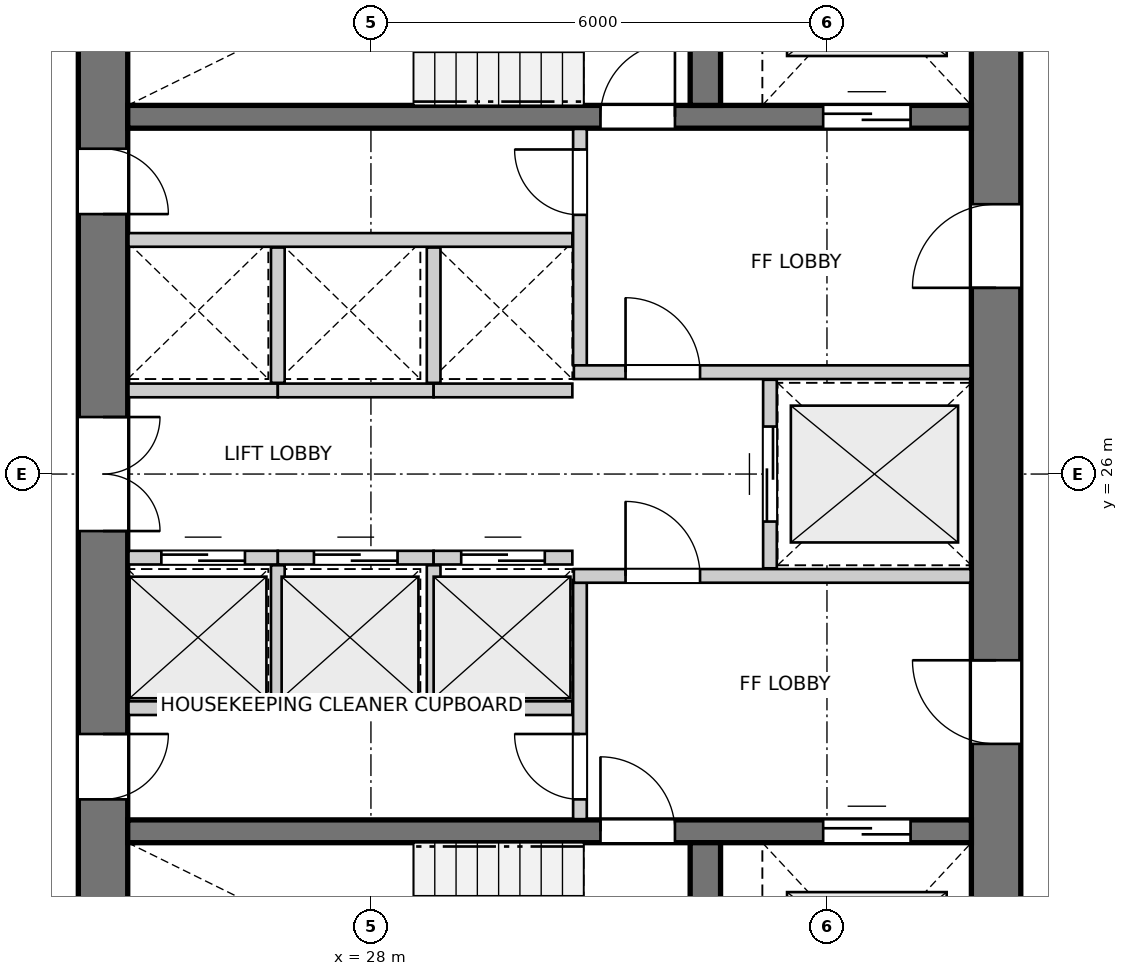
"""IFC4 building model, lengths in metres.
Left out: names, types, materials, properties, quantities, classifications, styles, units other than length and angle.
Written with IfcOpenShell. Run it as: python <this file> out.ifc"""

import sys

from ifc_helpers import new_model, si_unit, direction, frame, frame_2d, origin, place, context, subcontext, project, spatial, rectangle, extrude, source, transform, mapped, element, fill, save


model = new_model("IFC4")
c1 = context("Model", 3, precision=1e-05, world=origin(), true_north=direction((0.0, 1.0)))
c2 = subcontext(c1, "Body", "Model", "MODEL_VIEW")
j1 = project(units=[si_unit("LENGTHUNIT", "METRE"), si_unit("PLANEANGLEUNIT", "RADIAN")], contexts=[c1])
p1 = place(None, origin())
s1 = spatial("IfcSite", under=j1, at=p1, CompositionType="ELEMENT")
p2 = place(p1, origin())
s2 = spatial("IfcBuilding", under=s1, at=p2, CompositionType="ELEMENT")
p3 = place(p2, frame((0.0, 0.0, 105.6)))
s3 = spatial("IfcBuildingStorey", under=s2, at=p3, CompositionType="ELEMENT", Elevation=105.6)
p4 = place(p3, frame((24.475, 33.8, 0.0), z_axis=(0.0, 0.0, 1.0), x_axis=(0.0, -1.0, 0.0)))
e1 = element("IfcWall", 1, at=p4, inside=s3, PredefinedType="SHEAR", context=c2, shape_type="SweptSolid", body=[
    extrude(rectangle(XDim=15.6, YDim=0.65, at=frame_2d((7.8, 0.0))), origin(), (0.0, 0.0, 1.0), 2.935),
])
p5 = place(p4, frame((7.05, 0.0, 0.0)))
e2 = element("IfcOpeningElement", 2, at=p5, cuts=e1, PredefinedType="OPENING", context=c2, shape_type="SweptSolid", body=[
    extrude(rectangle(XDim=1.5, YDim=2.15, at=frame_2d((0.75, 1.075))), frame((0.0, 0.335, 0.0), z_axis=(0.0, -1.0, 0.0), x_axis=(1.0, 0.0, 0.0)), (0.0, 0.0, 1.0), 0.67),
])
p6 = place(p4, frame((3.52, 0.0, 0.0)))
e3 = element("IfcOpeningElement", 3, at=p6, cuts=e1, PredefinedType="OPENING", context=c2, shape_type="SweptSolid", body=[
    extrude(rectangle(XDim=0.86, YDim=2.05, at=frame_2d((0.43, 1.025))), frame((0.0, 0.335, 0.0), z_axis=(0.0, -1.0, 0.0), x_axis=(1.0, 0.0, 0.0)), (0.0, 0.0, 1.0), 0.67),
])
p7 = place(p4, frame((11.22, 0.0, 0.0)))
e4 = element("IfcOpeningElement", 4, at=p7, cuts=e1, PredefinedType="OPENING", context=c2, shape_type="SweptSolid", body=[
    extrude(rectangle(XDim=0.86, YDim=2.05, at=frame_2d((0.43, 1.025))), frame((0.0, 0.335, 0.0), z_axis=(0.0, -1.0, 0.0), x_axis=(1.0, 0.0, 0.0)), (0.0, 0.0, 1.0), 0.67),
])
p8 = place(p3, frame((36.225, 18.2, 0.0), z_axis=(0.0, 0.0, 1.0), x_axis=(0.0, 1.0, 0.0)))
e5 = element("IfcWall", 5, at=p8, inside=s3, PredefinedType="SHEAR", context=c2, shape_type="SweptSolid", body=[
    extrude(rectangle(XDim=15.6, YDim=0.65, at=frame_2d((7.8, 0.0))), origin(), (0.0, 0.0, 1.0), 2.935),
])
p9 = place(p8, frame((4.25, 0.0, 0.0)))
e6 = element("IfcOpeningElement", 6, at=p9, cuts=e5, PredefinedType="OPENING", context=c2, shape_type="SweptSolid", body=[
    extrude(rectangle(XDim=1.1, YDim=2.15, at=frame_2d((0.55, 1.075))), frame((0.0, 0.335, 0.0), z_axis=(0.0, -1.0, 0.0), x_axis=(1.0, 0.0, 0.0)), (0.0, 0.0, 1.0), 0.67),
])
p10 = place(p8, frame((10.25, 0.0, 0.0)))
e7 = element("IfcOpeningElement", 7, at=p10, cuts=e5, PredefinedType="OPENING", context=c2, shape_type="SweptSolid", body=[
    extrude(rectangle(XDim=1.1, YDim=2.15, at=frame_2d((0.55, 1.075))), frame((0.0, 0.335, 0.0), z_axis=(0.0, -1.0, 0.0), x_axis=(1.0, 0.0, 0.0)), (0.0, 0.0, 1.0), 0.67),
])
p11 = place(p3, frame((24.8, 21.3, 0.0), z_axis=(0.0, 0.0, 1.0), x_axis=(1.0, 0.0, 0.0)))
e8 = element("IfcWall", 8, at=p11, inside=s3, PredefinedType="SHEAR", context=c2, shape_type="SweptSolid", body=[
    extrude(rectangle(XDim=11.1, YDim=0.3, at=frame_2d((5.55, 0.0))), origin(), (0.0, 0.0, 1.0), 2.935),
])
p12 = place(p11, frame((6.22, 0.0, 0.0)))
e9 = element("IfcOpeningElement", 9, at=p12, cuts=e8, PredefinedType="OPENING", context=c2, shape_type="SweptSolid", body=[
    extrude(rectangle(XDim=0.98, YDim=2.15, at=frame_2d((0.49, 1.075))), frame((0.0, 0.16, 0.0), z_axis=(0.0, -1.0, 0.0), x_axis=(1.0, 0.0, 0.0)), (0.0, 0.0, 1.0), 0.32),
])
p13 = place(p11, frame((9.15, 0.0, 0.0)))
e10 = element("IfcOpeningElement", 10, at=p13, cuts=e8, PredefinedType="OPENING", context=c2, shape_type="SweptSolid", body=[
    extrude(rectangle(XDim=1.15, YDim=2.15, at=frame_2d((0.575, 1.075))), frame((0.0, 0.16, 0.0), z_axis=(0.0, -1.0, 0.0), x_axis=(1.0, 0.0, 0.0)), (0.0, 0.0, 1.0), 0.32),
])
p14 = place(p3, frame((32.4, 18.2, 0.0), z_axis=(0.0, 0.0, 1.0), x_axis=(0.0, 1.0, 0.0)))
e11 = element("IfcWall", 11, at=p14, inside=s3, PredefinedType="SHEAR", context=c2, shape_type="SweptSolid", body=[
    extrude(rectangle(XDim=2.95, YDim=0.4, at=frame_2d((1.475, 0.0))), origin(), (0.0, 0.0, 1.0), 2.935),
])
p15 = place(p3, frame((24.8, 30.7, 0.0), z_axis=(0.0, 0.0, 1.0), x_axis=(1.0, 0.0, 0.0)))
e12 = element("IfcWall", 12, at=p15, inside=s3, PredefinedType="SHEAR", context=c2, shape_type="SweptSolid", body=[
    extrude(rectangle(XDim=11.1, YDim=0.3, at=frame_2d((5.55, 0.0))), origin(), (0.0, 0.0, 1.0), 2.935),
])
p16 = place(p15, frame((6.22, 0.0, 0.0)))
e13 = element("IfcOpeningElement", 13, at=p16, cuts=e12, PredefinedType="OPENING", context=c2, shape_type="SweptSolid", body=[
    extrude(rectangle(XDim=0.98, YDim=2.15, at=frame_2d((0.49, 1.075))), frame((0.0, 0.16, 0.0), z_axis=(0.0, -1.0, 0.0), x_axis=(1.0, 0.0, 0.0)), (0.0, 0.0, 1.0), 0.32),
])
p17 = place(p15, frame((9.15, 0.0, 0.0)))
e14 = element("IfcOpeningElement", 14, at=p17, cuts=e12, PredefinedType="OPENING", context=c2, shape_type="SweptSolid", body=[
    extrude(rectangle(XDim=1.15, YDim=2.15, at=frame_2d((0.575, 1.075))), frame((0.0, 0.16, 0.0), z_axis=(0.0, -1.0, 0.0), x_axis=(1.0, 0.0, 0.0)), (0.0, 0.0, 1.0), 0.32),
])
p18 = place(p3, frame((32.4, 30.85, 0.0), z_axis=(0.0, 0.0, 1.0), x_axis=(0.0, 1.0, 0.0)))
e15 = element("IfcWall", 15, at=p18, inside=s3, PredefinedType="SHEAR", context=c2, shape_type="SweptSolid", body=[
    extrude(rectangle(XDim=2.95, YDim=0.4, at=frame_2d((1.475, 0.0))), origin(), (0.0, 0.0, 1.0), 2.935),
])
p19 = place(p3, frame((30.75, 21.46, 0.0), z_axis=(0.0, 0.0, 1.0), x_axis=(0.0, 1.0, 0.0)))
e16 = element("IfcWall", 16, at=p19, inside=s3, PredefinedType="PARTITIONING", context=c2, shape_type="SweptSolid", body=[
    extrude(rectangle(XDim=3.11, YDim=0.18, at=frame_2d((1.555, 0.0))), origin(), (0.0, 0.0, 1.0), 2.935),
])
p20 = place(p19, frame((0.26, 0.0, 0.0)))
e17 = element("IfcOpeningElement", 17, at=p20, cuts=e16, PredefinedType="OPENING", context=c2, shape_type="SweptSolid", body=[
    extrude(rectangle(XDim=0.86, YDim=2.05, at=frame_2d((0.43, 1.025))), frame((0.0, 0.1, 0.0), z_axis=(0.0, -1.0, 0.0), x_axis=(1.0, 0.0, 0.0)), (0.0, 0.0, 1.0), 0.2),
])
p21 = place(p3, frame((30.67, 24.66, 0.0), z_axis=(0.0, 0.0, 1.0), x_axis=(1.0, 0.0, 0.0)))
e18 = element("IfcWall", 18, at=p21, inside=s3, PredefinedType="PARTITIONING", context=c2, shape_type="SweptSolid", body=[
    extrude(rectangle(XDim=5.22, YDim=0.18, at=frame_2d((2.61, 0.0))), origin(), (0.0, 0.0, 1.0), 2.935),
])
p22 = place(p21, frame((0.68, 0.0, 0.0)))
e19 = element("IfcOpeningElement", 19, at=p22, cuts=e18, PredefinedType="OPENING", context=c2, shape_type="SweptSolid", body=[
    extrude(rectangle(XDim=0.98, YDim=2.15, at=frame_2d((0.49, 1.075))), frame((0.0, 0.1, 0.0), z_axis=(0.0, -1.0, 0.0), x_axis=(1.0, 0.0, 0.0)), (0.0, 0.0, 1.0), 0.2),
])
p23 = place(p3, frame((30.75, 27.43, 0.0), z_axis=(0.0, 0.0, 1.0), x_axis=(0.0, 1.0, 0.0)))
e20 = element("IfcWall", 20, at=p23, inside=s3, PredefinedType="PARTITIONING", context=c2, shape_type="SweptSolid", body=[
    extrude(rectangle(XDim=3.11, YDim=0.18, at=frame_2d((1.555, 0.0))), origin(), (0.0, 0.0, 1.0), 2.935),
])
p24 = place(p23, frame((1.98, 0.0, 0.0)))
e21 = element("IfcOpeningElement", 21, at=p24, cuts=e20, PredefinedType="OPENING", context=c2, shape_type="SweptSolid", body=[
    extrude(rectangle(XDim=0.86, YDim=2.05, at=frame_2d((0.43, 1.025))), frame((0.0, 0.1, 0.0), z_axis=(0.0, -1.0, 0.0), x_axis=(1.0, 0.0, 0.0)), (0.0, 0.0, 1.0), 0.2),
])
p25 = place(p3, frame((30.67, 27.34, 0.0), z_axis=(0.0, 0.0, 1.0), x_axis=(1.0, 0.0, 0.0)))
e22 = element("IfcWall", 22, at=p25, inside=s3, PredefinedType="PARTITIONING", context=c2, shape_type="SweptSolid", body=[
    extrude(rectangle(XDim=5.22, YDim=0.18, at=frame_2d((2.61, 0.0))), origin(), (0.0, 0.0, 1.0), 2.935),
])
p26 = place(p25, frame((0.68, 0.0, 0.0)))
e23 = element("IfcOpeningElement", 23, at=p26, cuts=e22, PredefinedType="OPENING", context=c2, shape_type="SweptSolid", body=[
    extrude(rectangle(XDim=0.98, YDim=2.15, at=frame_2d((0.49, 1.075))), frame((0.0, 0.1, 0.0), z_axis=(0.0, -1.0, 0.0), x_axis=(1.0, 0.0, 0.0)), (0.0, 0.0, 1.0), 0.2),
])
p27 = place(p3, frame((33.25, 24.76, 0.0), z_axis=(0.0, 0.0, 1.0), x_axis=(0.0, 1.0, 0.0)))
e24 = element("IfcWall", 24, at=p27, inside=s3, PredefinedType="PARTITIONING", context=c2, shape_type="SweptSolid", body=[
    extrude(rectangle(XDim=2.48, YDim=0.18, at=frame_2d((1.24, 0.0))), origin(), (0.0, 0.0, 1.0), 2.935),
])
p28 = place(p27, frame((0.615, 0.0, 0.0)))
e25 = element("IfcOpeningElement", 25, at=p28, cuts=e24, PredefinedType="OPENING", context=c2, shape_type="SweptSolid", body=[
    extrude(rectangle(XDim=1.25, YDim=2.15, at=frame_2d((0.625, 1.075))), frame((0.0, 0.1, 0.0), z_axis=(0.0, -1.0, 0.0), x_axis=(1.0, 0.0, 0.0)), (0.0, 0.0, 1.0), 0.2),
])
p29 = place(p3, frame((24.81, 22.92, 0.0), z_axis=(0.0, 0.0, 1.0), x_axis=(1.0, 0.0, 0.0)))
e26 = element("IfcWall", 26, at=p29, inside=s3, PredefinedType="PARTITIONING", context=c2, shape_type="SweptSolid", body=[
    extrude(rectangle(XDim=5.84, YDim=0.18, at=frame_2d((2.92, 0.0))), origin(), (0.0, 0.0, 1.0), 2.935),
])
p30 = place(p3, frame((24.81, 24.9, 0.0), z_axis=(0.0, 0.0, 1.0), x_axis=(1.0, 0.0, 0.0)))
e27 = element("IfcWall", 27, at=p30, inside=s3, PredefinedType="PARTITIONING", context=c2, shape_type="SweptSolid", body=[
    extrude(rectangle(XDim=1.965, YDim=0.18, at=frame_2d((0.982, 0.0))), origin(), (0.0, 0.0, 1.0), 2.935),
])
p31 = place(p30, frame((0.433, 0.0, 0.0)))
e28 = element("IfcOpeningElement", 28, at=p31, cuts=e27, PredefinedType="OPENING", context=c2, shape_type="SweptSolid", body=[
    extrude(rectangle(XDim=1.1, YDim=2.15, at=frame_2d((0.55, 1.075))), frame((0.0, 0.1, 0.0), z_axis=(0.0, -1.0, 0.0), x_axis=(1.0, 0.0, 0.0)), (0.0, 0.0, 1.0), 0.2),
])
p32 = place(p3, frame((26.775, 24.9, 0.0), z_axis=(0.0, 0.0, 1.0), x_axis=(1.0, 0.0, 0.0)))
e29 = element("IfcWall", 29, at=p32, inside=s3, PredefinedType="PARTITIONING", context=c2, shape_type="SweptSolid", body=[
    extrude(rectangle(XDim=2.05, YDim=0.18, at=frame_2d((1.025, 0.0))), origin(), (0.0, 0.0, 1.0), 2.935),
])
p33 = place(p32, frame((0.475, 0.0, 0.0)))
e30 = element("IfcOpeningElement", 30, at=p33, cuts=e29, PredefinedType="OPENING", context=c2, shape_type="SweptSolid", body=[
    extrude(rectangle(XDim=1.1, YDim=2.15, at=frame_2d((0.55, 1.075))), frame((0.0, 0.1, 0.0), z_axis=(0.0, -1.0, 0.0), x_axis=(1.0, 0.0, 0.0)), (0.0, 0.0, 1.0), 0.2),
])
p34 = place(p3, frame((26.775, 23.02, 0.0), z_axis=(0.0, 0.0, 1.0), x_axis=(0.0, 1.0, 0.0)))
e31 = element("IfcWall", 31, at=p34, inside=s3, PredefinedType="PARTITIONING", context=c2, shape_type="SweptSolid", body=[
    extrude(rectangle(XDim=1.78, YDim=0.18, at=frame_2d((0.89, 0.0))), origin(), (0.0, 0.0, 1.0), 2.935),
])
p35 = place(p3, frame((28.825, 24.9, 0.0), z_axis=(0.0, 0.0, 1.0), x_axis=(1.0, 0.0, 0.0)))
e32 = element("IfcWall", 32, at=p35, inside=s3, PredefinedType="PARTITIONING", context=c2, shape_type="SweptSolid", body=[
    extrude(rectangle(XDim=1.825, YDim=0.18, at=frame_2d((0.913, 0.0))), origin(), (0.0, 0.0, 1.0), 2.935),
])
p36 = place(p35, frame((0.363, 0.0, 0.0)))
e33 = element("IfcOpeningElement", 33, at=p36, cuts=e32, PredefinedType="OPENING", context=c2, shape_type="SweptSolid", body=[
    extrude(rectangle(XDim=1.1, YDim=2.15, at=frame_2d((0.55, 1.075))), frame((0.0, 0.1, 0.0), z_axis=(0.0, -1.0, 0.0), x_axis=(1.0, 0.0, 0.0)), (0.0, 0.0, 1.0), 0.2),
])
p37 = place(p3, frame((28.825, 23.02, 0.0), z_axis=(0.0, 0.0, 1.0), x_axis=(0.0, 1.0, 0.0)))
e34 = element("IfcWall", 34, at=p37, inside=s3, PredefinedType="PARTITIONING", context=c2, shape_type="SweptSolid", body=[
    extrude(rectangle(XDim=1.78, YDim=0.18, at=frame_2d((0.89, 0.0))), origin(), (0.0, 0.0, 1.0), 2.935),
])
p38 = place(p3, frame((24.81, 29.08, 0.0), z_axis=(0.0, 0.0, 1.0), x_axis=(1.0, 0.0, 0.0)))
e35 = element("IfcWall", 35, at=p38, inside=s3, PredefinedType="PARTITIONING", context=c2, shape_type="SweptSolid", body=[
    extrude(rectangle(XDim=5.84, YDim=0.18, at=frame_2d((2.92, 0.0))), origin(), (0.0, 0.0, 1.0), 2.935),
])
p39 = place(p3, frame((24.81, 27.1, 0.0), z_axis=(0.0, 0.0, 1.0), x_axis=(1.0, 0.0, 0.0)))
e36 = element("IfcWall", 36, at=p39, inside=s3, PredefinedType="PARTITIONING", context=c2, shape_type="SweptSolid", body=[
    extrude(rectangle(XDim=1.965, YDim=0.18, at=frame_2d((0.982, 0.0))), origin(), (0.0, 0.0, 1.0), 2.935),
])
p40 = place(p3, frame((26.775, 27.1, 0.0), z_axis=(0.0, 0.0, 1.0), x_axis=(1.0, 0.0, 0.0)))
e37 = element("IfcWall", 37, at=p40, inside=s3, PredefinedType="PARTITIONING", context=c2, shape_type="SweptSolid", body=[
    extrude(rectangle(XDim=2.05, YDim=0.18, at=frame_2d((1.025, 0.0))), origin(), (0.0, 0.0, 1.0), 2.935),
])
p41 = place(p3, frame((26.775, 27.2, 0.0), z_axis=(0.0, 0.0, 1.0), x_axis=(0.0, 1.0, 0.0)))
e38 = element("IfcWall", 38, at=p41, inside=s3, PredefinedType="PARTITIONING", context=c2, shape_type="SweptSolid", body=[
    extrude(rectangle(XDim=1.78, YDim=0.18, at=frame_2d((0.89, 0.0))), origin(), (0.0, 0.0, 1.0), 2.935),
])
p42 = place(p3, frame((28.825, 27.1, 0.0), z_axis=(0.0, 0.0, 1.0), x_axis=(1.0, 0.0, 0.0)))
e39 = element("IfcWall", 39, at=p42, inside=s3, PredefinedType="PARTITIONING", context=c2, shape_type="SweptSolid", body=[
    extrude(rectangle(XDim=1.825, YDim=0.18, at=frame_2d((0.913, 0.0))), origin(), (0.0, 0.0, 1.0), 2.935),
])
p43 = place(p3, frame((28.825, 27.2, 0.0), z_axis=(0.0, 0.0, 1.0), x_axis=(0.0, 1.0, 0.0)))
e40 = element("IfcWall", 40, at=p43, inside=s3, PredefinedType="PARTITIONING", context=c2, shape_type="SweptSolid", body=[
    extrude(rectangle(XDim=1.78, YDim=0.18, at=frame_2d((0.89, 0.0))), origin(), (0.0, 0.0, 1.0), 2.935),
])
m1 = source(origin(), c2, "Body", "SweptSolid", [
    extrude(rectangle(XDim=0.98, YDim=2.15, at=frame_2d((0.49, 1.075))), frame((0.0, 0.025, 0.0), z_axis=(0.0, -1.0, 0.0), x_axis=(1.0, 0.0, 0.0)), (0.0, 0.0, 1.0), 0.05),
])
p44 = place(p12, origin())
e41 = element("IfcDoor", 41, at=p44, inside=s3, OperationType="SINGLE_SWING_LEFT", PredefinedType="DOOR", context=c2, shape_type="MappedRepresentation", body=[
    mapped(m1, transform((0.0, 0.0, 0.0), x_axis=(1.0, 0.0, 0.0), y_axis=(0.0, 1.0, 0.0), z_axis=(0.0, 0.0, 1.0), scale=1.0)),
])
fill(e9, e41)
m2 = source(origin(), c2, "Body", "SweptSolid", [
    extrude(rectangle(XDim=1.15, YDim=2.15, at=frame_2d((0.575, 1.075))), frame((0.0, 0.025, 0.0), z_axis=(0.0, -1.0, 0.0), x_axis=(1.0, 0.0, 0.0)), (0.0, 0.0, 1.0), 0.05),
])
p45 = place(p13, origin())
e42 = element("IfcDoor", 42, at=p45, inside=s3, OperationType="DOUBLE_DOOR_SLIDING", PredefinedType="DOOR", context=c2, shape_type="MappedRepresentation", body=[
    mapped(m2, transform((0.0, 0.0, 0.0), x_axis=(1.0, 0.0, 0.0), y_axis=(0.0, 1.0, 0.0), z_axis=(0.0, 0.0, 1.0), scale=1.0)),
])
fill(e10, e42)
p46 = place(p16, origin())
e43 = element("IfcDoor", 43, at=p46, inside=s3, OperationType="SINGLE_SWING_RIGHT", PredefinedType="DOOR", context=c2, shape_type="MappedRepresentation", body=[
    mapped(m1, transform((0.0, 0.0, 0.0), x_axis=(1.0, 0.0, 0.0), y_axis=(0.0, 1.0, 0.0), z_axis=(0.0, 0.0, 1.0), scale=1.0)),
])
fill(e13, e43)
p47 = place(p17, origin())
e44 = element("IfcDoor", 44, at=p47, inside=s3, OperationType="DOUBLE_DOOR_SLIDING", PredefinedType="DOOR", context=c2, shape_type="MappedRepresentation", body=[
    mapped(m2, transform((0.0, 0.0, 0.0), x_axis=(1.0, 0.0, 0.0), y_axis=(0.0, 1.0, 0.0), z_axis=(0.0, 0.0, 1.0), scale=1.0)),
])
fill(e14, e44)
m3 = source(origin(), c2, "Body", "SweptSolid", [
    extrude(rectangle(XDim=1.1, YDim=2.15, at=frame_2d((0.55, 1.075))), frame((0.0, 0.025, 0.0), z_axis=(0.0, -1.0, 0.0), x_axis=(1.0, 0.0, 0.0)), (0.0, 0.0, 1.0), 0.05),
])
p48 = place(p9, origin())
e45 = element("IfcDoor", 45, at=p48, inside=s3, OperationType="SINGLE_SWING_RIGHT", PredefinedType="DOOR", context=c2, shape_type="MappedRepresentation", body=[
    mapped(m3, transform((0.0, 0.0, 0.0), x_axis=(1.0, 0.0, 0.0), y_axis=(0.0, 1.0, 0.0), z_axis=(0.0, 0.0, 1.0), scale=1.0)),
])
fill(e6, e45)
p49 = place(p10, origin())
e46 = element("IfcDoor", 46, at=p49, inside=s3, OperationType="SINGLE_SWING_LEFT", PredefinedType="DOOR", context=c2, shape_type="MappedRepresentation", body=[
    mapped(m3, transform((0.0, 0.0, 0.0), x_axis=(1.0, 0.0, 0.0), y_axis=(0.0, 1.0, 0.0), z_axis=(0.0, 0.0, 1.0), scale=1.0)),
])
fill(e7, e46)
m4 = source(origin(), c2, "Body", "SweptSolid", [
    extrude(rectangle(XDim=1.5, YDim=2.15, at=frame_2d((0.75, 1.075))), frame((0.0, 0.025, 0.0), z_axis=(0.0, -1.0, 0.0), x_axis=(1.0, 0.0, 0.0)), (0.0, 0.0, 1.0), 0.05),
])
p50 = place(p5, origin())
e47 = element("IfcDoor", 47, at=p50, inside=s3, OperationType="DOUBLE_DOOR_SINGLE_SWING", PredefinedType="DOOR", context=c2, shape_type="MappedRepresentation", body=[
    mapped(m4, transform((0.0, 0.0, 0.0), x_axis=(1.0, 0.0, 0.0), y_axis=(0.0, 1.0, 0.0), z_axis=(0.0, 0.0, 1.0), scale=1.0)),
])
fill(e2, e47)
m5 = source(origin(), c2, "Body", "SweptSolid", [
    extrude(rectangle(XDim=0.86, YDim=2.05, at=frame_2d((0.43, 1.025))), frame((0.0, 0.025, 0.0), z_axis=(0.0, -1.0, 0.0), x_axis=(1.0, 0.0, 0.0)), (0.0, 0.0, 1.0), 0.05),
])
p51 = place(p6, origin())
e48 = element("IfcDoor", 48, at=p51, inside=s3, OperationType="SINGLE_SWING_RIGHT", PredefinedType="DOOR", context=c2, shape_type="MappedRepresentation", body=[
    mapped(m5, transform((0.0, 0.0, 0.0), x_axis=(1.0, 0.0, 0.0), y_axis=(0.0, 1.0, 0.0), z_axis=(0.0, 0.0, 1.0), scale=1.0)),
])
fill(e3, e48)
p52 = place(p7, origin())
e49 = element("IfcDoor", 49, at=p52, inside=s3, OperationType="SINGLE_SWING_LEFT", PredefinedType="DOOR", context=c2, shape_type="MappedRepresentation", body=[
    mapped(m5, transform((0.0, 0.0, 0.0), x_axis=(1.0, 0.0, 0.0), y_axis=(0.0, 1.0, 0.0), z_axis=(0.0, 0.0, 1.0), scale=1.0)),
])
fill(e4, e49)
p53 = place(p20, origin())
e50 = element("IfcDoor", 50, at=p53, inside=s3, OperationType="SINGLE_SWING_RIGHT", PredefinedType="DOOR", context=c2, shape_type="MappedRepresentation", body=[
    mapped(m5, transform((0.0, 0.0, 0.0), x_axis=(1.0, 0.0, 0.0), y_axis=(0.0, 1.0, 0.0), z_axis=(0.0, 0.0, 1.0), scale=1.0)),
])
fill(e17, e50)
p54 = place(p22, origin())
e51 = element("IfcDoor", 51, at=p54, inside=s3, OperationType="SINGLE_SWING_LEFT", PredefinedType="DOOR", context=c2, shape_type="MappedRepresentation", body=[
    mapped(m1, transform((0.0, 0.0, 0.0), x_axis=(1.0, 0.0, 0.0), y_axis=(0.0, 1.0, 0.0), z_axis=(0.0, 0.0, 1.0), scale=1.0)),
])
fill(e19, e51)
p55 = place(p24, origin())
e52 = element("IfcDoor", 52, at=p55, inside=s3, OperationType="SINGLE_SWING_RIGHT", PredefinedType="DOOR", context=c2, shape_type="MappedRepresentation", body=[
    mapped(m5, transform((0.0, 0.0, 0.0), x_axis=(1.0, 0.0, 0.0), y_axis=(0.0, 1.0, 0.0), z_axis=(0.0, 0.0, 1.0), scale=1.0)),
])
fill(e21, e52)
p56 = place(p26, origin())
e53 = element("IfcDoor", 53, at=p56, inside=s3, OperationType="SINGLE_SWING_LEFT", PredefinedType="DOOR", context=c2, shape_type="MappedRepresentation", body=[
    mapped(m1, transform((0.0, 0.0, 0.0), x_axis=(1.0, 0.0, 0.0), y_axis=(0.0, 1.0, 0.0), z_axis=(0.0, 0.0, 1.0), scale=1.0)),
])
fill(e23, e53)
m6 = source(origin(), c2, "Body", "SweptSolid", [
    extrude(rectangle(XDim=1.25, YDim=2.15, at=frame_2d((0.625, 1.075))), frame((0.0, 0.025, 0.0), z_axis=(0.0, -1.0, 0.0), x_axis=(1.0, 0.0, 0.0)), (0.0, 0.0, 1.0), 0.05),
])
p57 = place(p28, origin())
e54 = element("IfcDoor", 54, at=p57, inside=s3, OperationType="DOUBLE_DOOR_SLIDING", PredefinedType="DOOR", context=c2, shape_type="MappedRepresentation", body=[
    mapped(m6, transform((0.0, 0.0, 0.0), x_axis=(1.0, 0.0, 0.0), y_axis=(0.0, 1.0, 0.0), z_axis=(0.0, 0.0, 1.0), scale=1.0)),
])
fill(e25, e54)
p58 = place(p31, origin())
e55 = element("IfcDoor", 55, at=p58, inside=s3, OperationType="DOUBLE_DOOR_SLIDING", PredefinedType="DOOR", context=c2, shape_type="MappedRepresentation", body=[
    mapped(m3, transform((0.0, 0.0, 0.0), x_axis=(1.0, 0.0, 0.0), y_axis=(0.0, 1.0, 0.0), z_axis=(0.0, 0.0, 1.0), scale=1.0)),
])
fill(e28, e55)
p59 = place(p33, origin())
e56 = element("IfcDoor", 56, at=p59, inside=s3, OperationType="DOUBLE_DOOR_SLIDING", PredefinedType="DOOR", context=c2, shape_type="MappedRepresentation", body=[
    mapped(m3, transform((0.0, 0.0, 0.0), x_axis=(1.0, 0.0, 0.0), y_axis=(0.0, 1.0, 0.0), z_axis=(0.0, 0.0, 1.0), scale=1.0)),
])
fill(e30, e56)
p60 = place(p36, origin())
e57 = element("IfcDoor", 57, at=p60, inside=s3, OperationType="DOUBLE_DOOR_SLIDING", PredefinedType="DOOR", context=c2, shape_type="MappedRepresentation", body=[
    mapped(m3, transform((0.0, 0.0, 0.0), x_axis=(1.0, 0.0, 0.0), y_axis=(0.0, 1.0, 0.0), z_axis=(0.0, 0.0, 1.0), scale=1.0)),
])
fill(e33, e57)
save(model, sys.argv[1])
